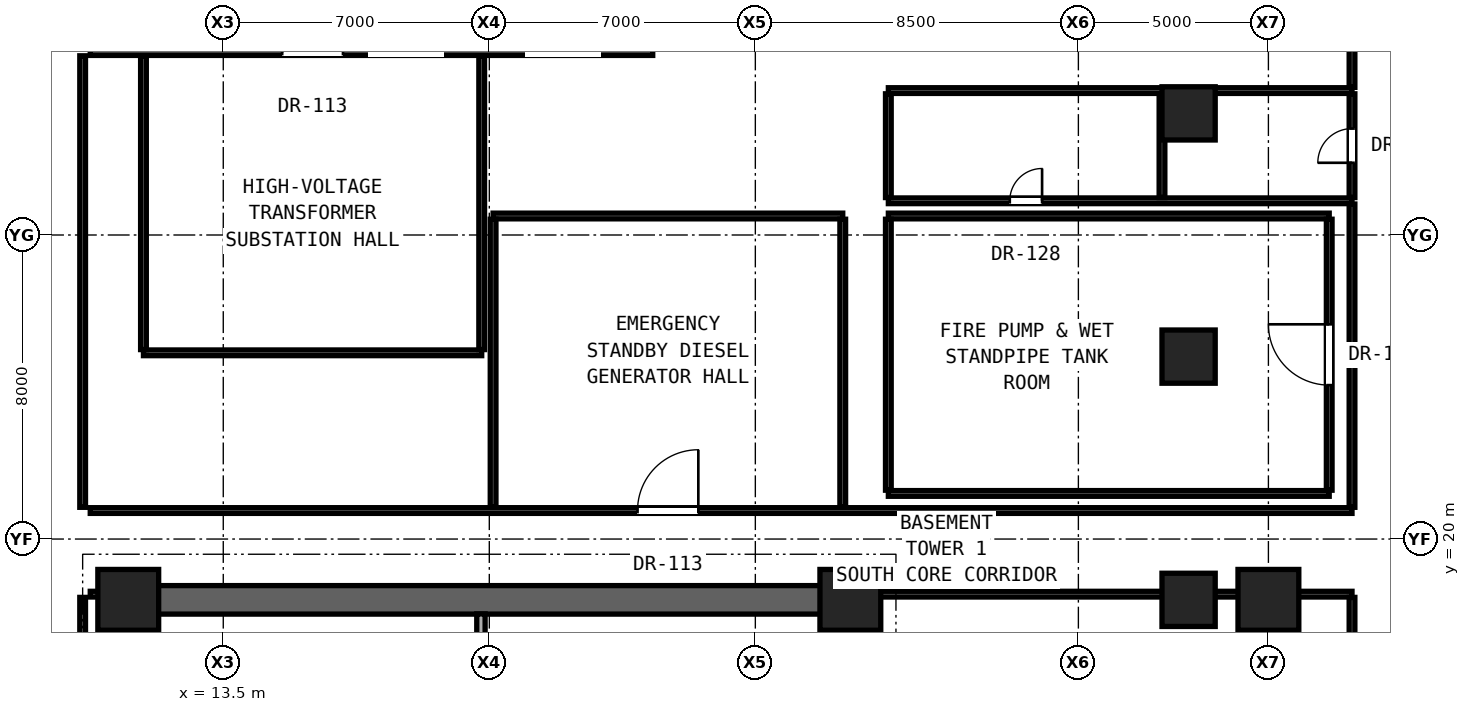
"""IFC4 building model, lengths in metres.
Left out: names, types, materials, properties, quantities, classifications, styles, units other than length and angle.
Written with IfcOpenShell. Run it as: python <this file> out.ifc"""

import sys

from ifc_helpers import new_model, si_unit, direction, frame, frame_2d, origin, origin_2d, place, context, subcontext, project, spatial, rectangle, hollow_rectangle, extrude, element, fill, save


model = new_model("IFC4")
c1 = context("Model", 3, precision=1e-05, world=origin(), true_north=direction((0.0, 1.0)))
c2 = subcontext(c1, "Body", "Model", "MODEL_VIEW")
j1 = project(units=[si_unit("LENGTHUNIT", "METRE"), si_unit("PLANEANGLEUNIT", "RADIAN")], contexts=[c1])
p1 = place(None, origin())
s1 = spatial("IfcSite", under=j1, at=p1, CompositionType="ELEMENT")
p2 = place(p1, origin())
s2 = spatial("IfcBuilding", under=s1, at=p2, CompositionType="ELEMENT")
p3 = place(p2, frame((0.0, 0.0, -4.8)))
s3 = spatial("IfcBuildingStorey", under=s2, at=p3, CompositionType="ELEMENT", Elevation=-4.8)
for number, where, z_axis, x_axis in (
    (1, (11.0, 18.4, 0.0), (0.0, 0.0, 1.0), (1.0, 0.0, 0.0)),
    (2, (30.0, 18.4, 0.0), (0.0, 0.0, 1.0), (1.0, 0.0, 0.0)),
):
    element("IfcColumn", number, at=place(p3, frame(where, z_axis=z_axis, x_axis=x_axis)), inside=s3, PredefinedType="COLUMN", context=c2, shape_type="SweptSolid", body=[
        extrude(rectangle(XDim=1.6, YDim=1.6, at=origin_2d()), origin(), (0.0, 0.0, 1.0), 4.8),
    ])
for number, where, z_axis, x_axis in (
    (3, (38.9, 18.4, 0.0), (0.0, 0.0, 1.0), (1.0, 0.0, 0.0)),
    (4, (38.9, 24.8, 0.0), (0.0, 0.0, 1.0), (1.0, 0.0, 0.0)),
    (5, (38.9, 31.2, 0.0), (0.0, 0.0, 1.0), (1.0, 0.0, 0.0)),
):
    element("IfcColumn", number, at=place(p3, frame(where, z_axis=z_axis, x_axis=x_axis)), inside=s3, PredefinedType="COLUMN", context=c2, shape_type="SweptSolid", body=[
        extrude(hollow_rectangle(XDim=1.4, YDim=1.4, WallThickness=0.08, at=origin_2d()), origin(), (0.0, 0.0, 1.0), 4.8),
    ])
for number, where, z_axis, x_axis in (
    (6, (11.0, 12.4, 0.0), (0.0, 0.0, 1.0), (0.0, 1.0, 0.0)),
    (7, (30.0, 12.4, 0.0), (0.0, 0.0, 1.0), (0.0, 1.0, 0.0)),
):
    element("IfcWall", number, at=place(p3, frame(where, z_axis=z_axis, x_axis=x_axis)), inside=s3, PredefinedType="SHEAR", context=c2, shape_type="SweptSolid", body=[
        extrude(rectangle(XDim=6.0, YDim=0.75, at=frame_2d((3.0, 0.0))), origin(), (0.0, 0.0, 1.0), 4.48),
    ])
p4 = place(p3, frame((11.0, 18.4, 0.0), z_axis=(0.0, 0.0, 1.0), x_axis=(1.0, 0.0, 0.0)))
e8 = element("IfcWall", 8, at=p4, inside=s3, PredefinedType="SHEAR", context=c2, shape_type="SweptSolid", body=[
    extrude(rectangle(XDim=19.0, YDim=0.75, at=frame_2d((9.5, 0.0))), origin(), (0.0, 0.0, 1.0), 4.48),
])
p5 = place(p3, frame((41.0, 18.4, 0.0), z_axis=(0.0, 0.0, 1.0), x_axis=(1.0, 0.0, 0.0)))
e9 = element("IfcColumn", 9, at=p5, inside=s3, PredefinedType="COLUMN", context=c2, shape_type="SweptSolid", body=[
    extrude(rectangle(XDim=1.6, YDim=1.6, at=origin_2d()), origin(), (0.0, 0.0, 1.0), 4.8),
])
p6 = place(p3, frame((10.0, 18.55, 0.0), z_axis=(0.0, 0.0, 1.0), x_axis=(1.0, 0.0, 0.0)))
e10 = element("IfcWall", 10, at=p6, inside=s3, PredefinedType="PARTITIONING", context=c2, shape_type="SweptSolid", body=[
    extrude(rectangle(XDim=0.98, YDim=0.15, at=frame_2d((0.49, 0.0))), origin(), (0.0, 0.0, 1.0), 3.372),
])
p7 = place(p3, frame((30.02, 18.55, 0.0), z_axis=(0.0, 0.0, 1.0), x_axis=(1.0, 0.0, 0.0)))
e11 = element("IfcWall", 11, at=p7, inside=s3, PredefinedType="PARTITIONING", context=c2, shape_type="SweptSolid", body=[
    extrude(rectangle(XDim=13.18, YDim=0.15, at=frame_2d((6.59, 0.0))), origin(), (0.0, 0.0, 1.0), 3.252),
])
p8 = place(p3, frame((10.0, 20.75, 0.0), z_axis=(0.0, 0.0, 1.0), x_axis=(1.0, 0.0, 0.0)))
e12 = element("IfcWall", 12, at=p8, inside=s3, PredefinedType="PARTITIONING", context=c2, shape_type="SweptSolid", body=[
    extrude(rectangle(XDim=33.2, YDim=0.15, at=frame_2d((16.6, 0.0))), origin(), (0.0, 0.0, 1.0), 3.252),
])
p9 = place(p8, frame((14.4, 0.0, 0.0)))
e13 = element("IfcOpeningElement", 13, at=p9, cuts=e12, PredefinedType="OPENING", context=c2, shape_type="SweptSolid", body=[
    extrude(rectangle(XDim=1.6, YDim=2.3, at=frame_2d((0.8, 1.15))), frame((0.0, 0.085, 0.0), z_axis=(0.0, -1.0, 0.0), x_axis=(1.0, 0.0, 0.0)), (0.0, 0.0, 1.0), 0.17),
])
p10 = place(p3, frame((31.0, 21.2, 0.0), z_axis=(0.0, 0.0, 1.0), x_axis=(1.0, 0.0, 0.0)))
e14 = element("IfcWall", 14, at=p10, inside=s3, PredefinedType="PARTITIONING", context=c2, shape_type="SweptSolid", body=[
    extrude(rectangle(XDim=11.6, YDim=0.15, at=frame_2d((5.8, 0.0))), origin(), (0.0, 0.0, 1.0), 3.252),
])
p11 = place(p3, frame((11.4, 24.9, 0.0), z_axis=(0.0, 0.0, 1.0), x_axis=(1.0, 0.0, 0.0)))
e15 = element("IfcWall", 15, at=p11, inside=s3, PredefinedType="PARTITIONING", context=c2, shape_type="SweptSolid", body=[
    extrude(rectangle(XDim=8.9, YDim=0.15, at=frame_2d((4.45, 0.0))), origin(), (0.0, 0.0, 1.0), 3.432),
])
p12 = place(p3, frame((20.6, 28.5, 0.0), z_axis=(0.0, 0.0, 1.0), x_axis=(1.0, 0.0, 0.0)))
e16 = element("IfcWall", 16, at=p12, inside=s3, PredefinedType="PARTITIONING", context=c2, shape_type="SweptSolid", body=[
    extrude(rectangle(XDim=9.2, YDim=0.15, at=frame_2d((4.6, 0.0))), origin(), (0.0, 0.0, 1.0), 3.432),
])
p13 = place(p3, frame((31.0, 28.5, 0.0), z_axis=(0.0, 0.0, 1.0), x_axis=(1.0, 0.0, 0.0)))
e17 = element("IfcWall", 17, at=p13, inside=s3, PredefinedType="PARTITIONING", context=c2, shape_type="SweptSolid", body=[
    extrude(rectangle(XDim=11.6, YDim=0.15, at=frame_2d((5.8, 0.0))), origin(), (0.0, 0.0, 1.0), 3.252),
])
p14 = place(p3, frame((31.0, 28.9, 0.0), z_axis=(0.0, 0.0, 1.0), x_axis=(1.0, 0.0, 0.0)))
e18 = element("IfcWall", 18, at=p14, inside=s3, PredefinedType="PARTITIONING", context=c2, shape_type="SweptSolid", body=[
    extrude(rectangle(XDim=12.2, YDim=0.15, at=frame_2d((6.1, 0.0))), origin(), (0.0, 0.0, 1.0), 3.252),
])
p15 = place(p14, frame((3.195, 0.0, 0.0)))
e19 = element("IfcOpeningElement", 19, at=p15, cuts=e18, PredefinedType="OPENING", context=c2, shape_type="SweptSolid", body=[
    extrude(rectangle(XDim=0.85, YDim=2.01, at=frame_2d((0.425, 1.005))), frame((0.0, 0.085, 0.0), z_axis=(0.0, -1.0, 0.0), x_axis=(1.0, 0.0, 0.0)), (0.0, 0.0, 1.0), 0.17),
])
p16 = place(p3, frame((31.0, 31.8, 0.0), z_axis=(0.0, 0.0, 1.0), x_axis=(1.0, 0.0, 0.0)))
e20 = element("IfcWall", 20, at=p16, inside=s3, PredefinedType="PARTITIONING", context=c2, shape_type="SweptSolid", body=[
    extrude(rectangle(XDim=12.2, YDim=0.15, at=frame_2d((6.1, 0.0))), origin(), (0.0, 0.0, 1.0), 3.252),
])
p17 = place(p3, frame((10.0, 32.8, 0.0), z_axis=(0.0, 0.0, 1.0), x_axis=(1.0, 0.0, 0.0)))
e21 = element("IfcWall", 21, at=p17, inside=s3, PredefinedType="PARTITIONING", context=c2, shape_type="SweptSolid", body=[
    extrude(rectangle(XDim=14.8, YDim=0.15, at=frame_2d((7.4, 0.0))), origin(), (0.0, 0.0, 1.0), 3.432),
])
p18 = place(p17, frame((5.05, 0.0, 0.0)))
e22 = element("IfcOpeningElement", 22, at=p18, cuts=e21, PredefinedType="OPENING", context=c2, shape_type="SweptSolid", body=[
    extrude(rectangle(XDim=1.6, YDim=2.3, at=frame_2d((0.8, 1.15))), frame((0.0, 0.085, 0.0), z_axis=(0.0, -1.0, 0.0), x_axis=(1.0, 0.0, 0.0)), (0.0, 0.0, 1.0), 0.17),
])
p19 = place(p3, frame((9.8, 12.235, 0.0), z_axis=(0.0, 0.0, 1.0), x_axis=(0.0, 1.0, 0.0)))
e23 = element("IfcWall", 23, at=p19, inside=s3, PredefinedType="PARTITIONING", context=c2, shape_type="SweptSolid", body=[
    extrude(rectangle(XDim=6.23, YDim=0.15, at=frame_2d((3.115, 0.0))), origin(), (0.0, 0.0, 1.0), 3.372),
])
p20 = place(p3, frame((9.8, 20.835, 0.0), z_axis=(0.0, 0.0, 1.0), x_axis=(0.0, 1.0, 0.0)))
e24 = element("IfcWall", 24, at=p20, inside=s3, PredefinedType="PARTITIONING", context=c2, shape_type="SweptSolid", body=[
    extrude(rectangle(XDim=11.88, YDim=0.15, at=frame_2d((5.94, 0.0))), origin(), (0.0, 0.0, 1.0), 3.699),
])
p21 = place(p3, frame((11.4, 24.985, 0.0), z_axis=(0.0, 0.0, 1.0), x_axis=(0.0, 1.0, 0.0)))
e25 = element("IfcWall", 25, at=p21, inside=s3, PredefinedType="PARTITIONING", context=c2, shape_type="SweptSolid", body=[
    extrude(rectangle(XDim=7.73, YDim=0.15, at=frame_2d((3.865, 0.0))), origin(), (0.0, 0.0, 1.0), 3.432),
])
p22 = place(p3, frame((20.28, 16.555, 0.0), z_axis=(0.0, 0.0, 1.0), x_axis=(0.0, 1.0, 0.0)))
e26 = element("IfcWall", 26, at=p22, inside=s3, PredefinedType="SOLIDWALL", context=c2, shape_type="SweptSolid", body=[
    extrude(rectangle(XDim=1.475, YDim=0.22, at=frame_2d((0.738, 0.0))), origin(), (0.0, 0.0, 1.0), 4.3),
])
p23 = place(p3, frame((20.3, 24.985, 0.0), z_axis=(0.0, 0.0, 1.0), x_axis=(0.0, 1.0, 0.0)))
e27 = element("IfcWall", 27, at=p23, inside=s3, PredefinedType="PARTITIONING", context=c2, shape_type="SweptSolid", body=[
    extrude(rectangle(XDim=7.73, YDim=0.15, at=frame_2d((3.865, 0.0))), origin(), (0.0, 0.0, 1.0), 3.432),
])
for number, where, z_axis, x_axis in (
    (28, (20.6, 20.85, 0.0), (0.0, 0.0, 1.0), (0.0, 1.0, 0.0)),
    (29, (29.8, 20.85, 0.0), (0.0, 0.0, 1.0), (0.0, 1.0, 0.0)),
):
    element("IfcWall", number, at=place(p3, frame(where, z_axis=z_axis, x_axis=x_axis)), inside=s3, PredefinedType="PARTITIONING", context=c2, shape_type="SweptSolid", body=[
        extrude(rectangle(XDim=7.565, YDim=0.15, at=frame_2d((3.782, 0.0))), origin(), (0.0, 0.0, 1.0), 3.432),
    ])
p24 = place(p3, frame((31.0, 21.285, 0.0), z_axis=(0.0, 0.0, 1.0), x_axis=(0.0, 1.0, 0.0)))
e30 = element("IfcWall", 30, at=p24, inside=s3, PredefinedType="PARTITIONING", context=c2, shape_type="SweptSolid", body=[
    extrude(rectangle(XDim=7.13, YDim=0.15, at=frame_2d((3.565, 0.0))), origin(), (0.0, 0.0, 1.0), 3.699),
])
for number, where, z_axis, x_axis in (
    (31, (31.0, 28.985, 0.0), (0.0, 0.0, 1.0), (0.0, 1.0, 0.0)),
    (32, (38.2, 28.985, 0.0), (0.0, 0.0, 1.0), (0.0, 1.0, 0.0)),
):
    element("IfcWall", number, at=place(p3, frame(where, z_axis=z_axis, x_axis=x_axis)), inside=s3, PredefinedType="PARTITIONING", context=c2, shape_type="SweptSolid", body=[
        extrude(rectangle(XDim=2.73, YDim=0.15, at=frame_2d((1.365, 0.0))), origin(), (0.0, 0.0, 1.0), 3.699),
    ])
p25 = place(p3, frame((42.6, 21.285, 0.0), z_axis=(0.0, 0.0, 1.0), x_axis=(0.0, 1.0, 0.0)))
e33 = element("IfcWall", 33, at=p25, inside=s3, PredefinedType="PARTITIONING", context=c2, shape_type="SweptSolid", body=[
    extrude(rectangle(XDim=7.13, YDim=0.15, at=frame_2d((3.565, 0.0))), origin(), (0.0, 0.0, 1.0), 4.3),
])
p26 = place(p25, frame((2.765, 0.0, 0.0)))
e34 = element("IfcOpeningElement", 34, at=p26, cuts=e33, PredefinedType="OPENING", context=c2, shape_type="SweptSolid", body=[
    extrude(rectangle(XDim=1.6, YDim=2.3, at=frame_2d((0.8, 1.15))), frame((0.0, 0.085, 0.0), z_axis=(0.0, -1.0, 0.0), x_axis=(1.0, 0.0, 0.0)), (0.0, 0.0, 1.0), 0.17),
])
p27 = place(p3, frame((43.2, 12.235, 0.0), z_axis=(0.0, 0.0, 1.0), x_axis=(0.0, 1.0, 0.0)))
e35 = element("IfcWall", 35, at=p27, inside=s3, PredefinedType="PARTITIONING", context=c2, shape_type="SweptSolid", body=[
    extrude(rectangle(XDim=6.23, YDim=0.15, at=frame_2d((3.115, 0.0))), origin(), (0.0, 0.0, 1.0), 3.252),
])
p28 = place(p3, frame((43.2, 20.835, 0.0), z_axis=(0.0, 0.0, 1.0), x_axis=(0.0, 1.0, 0.0)))
e36 = element("IfcWall", 36, at=p28, inside=s3, PredefinedType="PARTITIONING", context=c2, shape_type="SweptSolid", body=[
    extrude(rectangle(XDim=7.98, YDim=0.15, at=frame_2d((3.99, 0.0))), origin(), (0.0, 0.0, 1.0), 4.3),
])
p29 = place(p3, frame((43.2, 28.985, 0.0), z_axis=(0.0, 0.0, 1.0), x_axis=(0.0, 1.0, 0.0)))
e37 = element("IfcWall", 37, at=p29, inside=s3, PredefinedType="PARTITIONING", context=c2, shape_type="SweptSolid", body=[
    extrude(rectangle(XDim=2.73, YDim=0.15, at=frame_2d((1.365, 0.0))), origin(), (0.0, 0.0, 1.0), 4.3),
])
p30 = place(p29, frame((0.915, 0.0, 0.0)))
e38 = element("IfcOpeningElement", 38, at=p30, cuts=e37, PredefinedType="OPENING", context=c2, shape_type="SweptSolid", body=[
    extrude(rectangle(XDim=0.9, YDim=2.1, at=frame_2d((0.45, 1.05))), frame((0.0, 0.085, 0.0), z_axis=(0.0, -1.0, 0.0), x_axis=(1.0, 0.0, 0.0)), (0.0, 0.0, 1.0), 0.17),
])
p31 = place(p3, frame((43.2, 31.885, 0.0), z_axis=(0.0, 0.0, 1.0), x_axis=(0.0, 1.0, 0.0)))
e39 = element("IfcWall", 39, at=p31, inside=s3, PredefinedType="PARTITIONING", context=c2, shape_type="SweptSolid", body=[
    extrude(rectangle(XDim=15.165, YDim=0.15, at=frame_2d((7.583, 0.0))), origin(), (0.0, 0.0, 1.0), 3.252),
])
p32 = place(p18, origin())
e40 = element("IfcDoor", 40, at=p32, inside=s3, OperationType="SINGLE_SWING_LEFT", PredefinedType="DOOR", context=c2, shape_type="SweptSolid", body=[
    extrude(rectangle(XDim=1.6, YDim=2.3, at=frame_2d((0.8, 1.15))), frame((0.0, 0.025, 0.0), z_axis=(0.0, -1.0, 0.0), x_axis=(1.0, 0.0, 0.0)), (0.0, 0.0, 1.0), 0.05),
])
fill(e22, e40)
p33 = place(p9, origin())
e41 = element("IfcDoor", 41, at=p33, inside=s3, OperationType="SINGLE_SWING_RIGHT", PredefinedType="DOOR", context=c2, shape_type="SweptSolid", body=[
    extrude(rectangle(XDim=1.6, YDim=2.3, at=frame_2d((0.8, 1.15))), frame((0.0, 0.025, 0.0), z_axis=(0.0, -1.0, 0.0), x_axis=(1.0, 0.0, 0.0)), (0.0, 0.0, 1.0), 0.05),
])
fill(e13, e41)
p34 = place(p26, origin())
e42 = element("IfcDoor", 42, at=p34, inside=s3, OperationType="SINGLE_SWING_RIGHT", PredefinedType="DOOR", context=c2, shape_type="SweptSolid", body=[
    extrude(rectangle(XDim=1.6, YDim=2.3, at=frame_2d((0.8, 1.15))), frame((0.0, 0.025, 0.0), z_axis=(0.0, -1.0, 0.0), x_axis=(1.0, 0.0, 0.0)), (0.0, 0.0, 1.0), 0.05),
])
fill(e34, e42)
p35 = place(p15, origin())
e43 = element("IfcDoor", 43, at=p35, inside=s3, OperationType="SINGLE_SWING_RIGHT", PredefinedType="DOOR", context=c2, shape_type="SweptSolid", body=[
    extrude(rectangle(XDim=0.85, YDim=2.01, at=frame_2d((0.425, 1.005))), frame((0.0, 0.025, 0.0), z_axis=(0.0, -1.0, 0.0), x_axis=(1.0, 0.0, 0.0)), (0.0, 0.0, 1.0), 0.05),
])
fill(e19, e43)
p36 = place(p30, origin())
e44 = element("IfcDoor", 44, at=p36, inside=s3, OperationType="SINGLE_SWING_LEFT", PredefinedType="DOOR", context=c2, shape_type="SweptSolid", body=[
    extrude(rectangle(XDim=0.9, YDim=2.1, at=frame_2d((0.45, 1.05))), frame((0.0, 0.025, 0.0), z_axis=(0.0, -1.0, 0.0), x_axis=(1.0, 0.0, 0.0)), (0.0, 0.0, 1.0), 0.05),
])
fill(e38, e44)
save(model, sys.argv[1])
